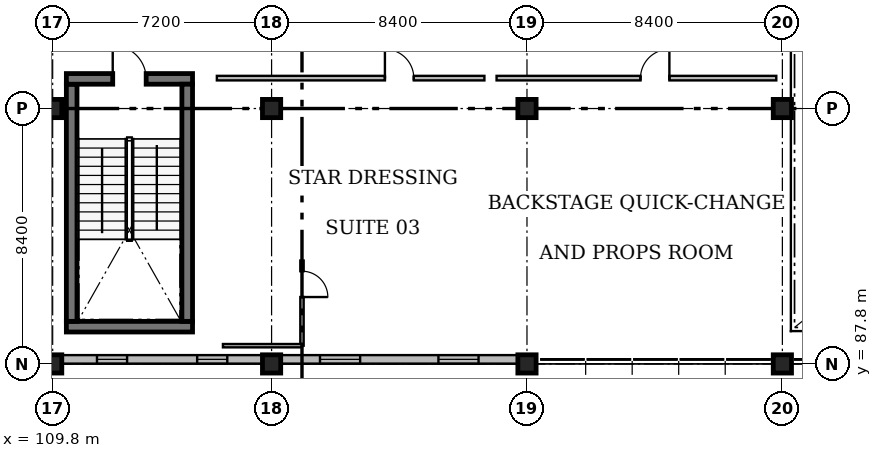
"""IFC4 building model, lengths in metres.
Left out: names, types, materials, properties, quantities, classifications, styles, units other than length and angle.
Written with IfcOpenShell. Run it as: python <this file> out.ifc"""

import sys

from ifc_helpers import new_model, si_unit, direction, frame, frame_2d, origin, origin_2d, place, context, subcontext, project, spatial, rectangle, extrude, element, fill, save


model = new_model("IFC4")
c1 = context("Model", 3, precision=1e-05, world=origin(), true_north=direction((0.0, 1.0)))
c2 = subcontext(c1, "Body", "Model", "MODEL_VIEW")
j1 = project(units=[si_unit("LENGTHUNIT", "METRE"), si_unit("PLANEANGLEUNIT", "RADIAN")], contexts=[c1])
p1 = place(None, origin())
s1 = spatial("IfcSite", under=j1, at=p1, CompositionType="ELEMENT")
p2 = place(p1, origin())
s2 = spatial("IfcBuilding", under=s1, at=p2, CompositionType="ELEMENT")
p3 = place(p2, frame((0.0, 0.0, 4.8)))
s3 = spatial("IfcBuildingStorey", under=s2, at=p3, CompositionType="ELEMENT", Elevation=4.8)
for number, where, z_axis, x_axis in (
    (1, (109.8, 87.8, 0.0), (0.0, 0.0, 1.0), (1.0, 0.0, 0.0)),
    (2, (109.8, 96.2, 0.0), (0.0, 0.0, 1.0), (1.0, 0.0, 0.0)),
    (3, (117.0, 87.8, 0.0), (0.0, 0.0, 1.0), (1.0, 0.0, 0.0)),
    (4, (117.0, 96.2, 0.0), (0.0, 0.0, 1.0), (1.0, 0.0, 0.0)),
    (5, (125.4, 87.8, 0.0), (0.0, 0.0, 1.0), (1.0, 0.0, 0.0)),
    (6, (125.4, 96.2, 0.0), (0.0, 0.0, 1.0), (1.0, 0.0, 0.0)),
    (7, (133.8, 87.8, 0.0), (0.0, 0.0, 1.0), (1.0, 0.0, 0.0)),
    (8, (133.8, 96.2, 0.0), (0.0, 0.0, 1.0), (1.0, 0.0, 0.0)),
):
    element("IfcColumn", number, at=place(p3, frame(where, z_axis=z_axis, x_axis=x_axis)), inside=s3, PredefinedType="COLUMN", context=c2, shape_type="SweptSolid", body=[
        extrude(rectangle(XDim=0.6, YDim=0.6, at=origin_2d()), origin(), (0.0, 0.0, 1.0), 4.2),
    ])
p4 = place(p3, frame((114.4, 89.025, 0.0), z_axis=(0.0, 0.0, 1.0), x_axis=(-1.0, 0.0, 0.0)))
e9 = element("IfcWall", 9, at=p4, inside=s3, PredefinedType="SOLIDWALL", context=c2, shape_type="SweptSolid", body=[
    extrude(rectangle(XDim=4.15, YDim=0.35, at=frame_2d((2.075, 0.0))), origin(), (0.0, 0.0, 1.0), 4.2),
])
p5 = place(p3, frame((110.425, 89.2, 0.0), z_axis=(0.0, 0.0, 1.0), x_axis=(0.0, 1.0, 0.0)))
e10 = element("IfcWall", 10, at=p5, inside=s3, PredefinedType="SOLIDWALL", context=c2, shape_type="SweptSolid", body=[
    extrude(rectangle(XDim=7.8, YDim=0.35, at=frame_2d((3.9, 0.0))), origin(), (0.0, 0.0, 1.0), 4.2),
])
p6 = place(p3, frame((110.25, 97.175, 0.0), z_axis=(0.0, 0.0, 1.0), x_axis=(1.0, 0.0, 0.0)))
e11 = element("IfcWall", 11, at=p6, inside=s3, PredefinedType="SOLIDWALL", context=c2, shape_type="SweptSolid", body=[
    extrude(rectangle(XDim=4.15, YDim=0.35, at=frame_2d((2.075, 0.0))), origin(), (0.0, 0.0, 1.0), 4.2),
])
p7 = place(p6, frame((1.525, 0.0, 0.0)))
e12 = element("IfcOpeningElement", 12, at=p7, cuts=e11, PredefinedType="OPENING", context=c2, shape_type="SweptSolid", body=[
    extrude(rectangle(XDim=1.1, YDim=2.15, at=frame_2d((0.55, 1.075))), frame((0.0, 0.195, 0.0), z_axis=(0.0, -1.0, 0.0), x_axis=(1.0, 0.0, 0.0)), (0.0, 0.0, 1.0), 0.39),
])
p8 = place(p3, frame((114.225, 97.0, 0.0), z_axis=(0.0, 0.0, 1.0), x_axis=(0.0, -1.0, 0.0)))
e13 = element("IfcWall", 13, at=p8, inside=s3, PredefinedType="SOLIDWALL", context=c2, shape_type="SweptSolid", body=[
    extrude(rectangle(XDim=7.8, YDim=0.35, at=frame_2d((3.9, 0.0))), origin(), (0.0, 0.0, 1.0), 4.2),
])
p9 = place(p3, frame((110.105, 87.95, 0.0), z_axis=(0.0, 0.0, 1.0), x_axis=(1.0, 0.0, 0.0)))
e14 = element("IfcWall", 14, at=p9, inside=s3, PredefinedType="SOLIDWALL", context=c2, shape_type="SweptSolid", body=[
    extrude(rectangle(XDim=6.59, YDim=0.28, at=frame_2d((3.295, 0.0))), origin(), (0.0, 0.0, 1.0), 3.273),
])
p10 = place(p9, frame((1.153, 0.0, 0.95)))
e15 = element("IfcOpeningElement", 15, at=p10, cuts=e14, PredefinedType="OPENING", context=c2, shape_type="SweptSolid", body=[
    extrude(rectangle(XDim=0.99, YDim=1.8, at=frame_2d((0.495, 0.9))), frame((0.0, 0.16, 0.0), z_axis=(0.0, -1.0, 0.0), x_axis=(1.0, 0.0, 0.0)), (0.0, 0.0, 1.0), 0.32),
])
p11 = place(p9, frame((4.448, 0.0, 0.95)))
e16 = element("IfcOpeningElement", 16, at=p11, cuts=e14, PredefinedType="OPENING", context=c2, shape_type="SweptSolid", body=[
    extrude(rectangle(XDim=0.99, YDim=1.8, at=frame_2d((0.495, 0.9))), frame((0.0, 0.16, 0.0), z_axis=(0.0, -1.0, 0.0), x_axis=(1.0, 0.0, 0.0)), (0.0, 0.0, 1.0), 0.32),
])
p12 = place(p3, frame((117.305, 87.95, 0.0), z_axis=(0.0, 0.0, 1.0), x_axis=(1.0, 0.0, 0.0)))
e17 = element("IfcWall", 17, at=p12, inside=s3, PredefinedType="SOLIDWALL", context=c2, shape_type="SweptSolid", body=[
    extrude(rectangle(XDim=7.79, YDim=0.28, at=frame_2d((3.895, 0.0))), origin(), (0.0, 0.0, 1.0), 3.273),
])
p13 = place(p12, frame((1.288, 0.0, 0.95)))
e18 = element("IfcOpeningElement", 18, at=p13, cuts=e17, PredefinedType="OPENING", context=c2, shape_type="SweptSolid", body=[
    extrude(rectangle(XDim=1.32, YDim=1.65, at=frame_2d((0.66, 0.825))), frame((0.0, 0.16, 0.0), z_axis=(0.0, -1.0, 0.0), x_axis=(1.0, 0.0, 0.0)), (0.0, 0.0, 1.0), 0.32),
])
p14 = place(p12, frame((5.183, 0.0, 0.95)))
e19 = element("IfcOpeningElement", 19, at=p14, cuts=e17, PredefinedType="OPENING", context=c2, shape_type="SweptSolid", body=[
    extrude(rectangle(XDim=1.32, YDim=1.65, at=frame_2d((0.66, 0.825))), frame((0.0, 0.16, 0.0), z_axis=(0.0, -1.0, 0.0), x_axis=(1.0, 0.0, 0.0)), (0.0, 0.0, 1.0), 0.32),
])
p15 = place(p3, frame((118.0, 91.2, 0.0), z_axis=(0.0, 0.0, 1.0), x_axis=(0.0, -1.0, 0.0)))
e20 = element("IfcWall", 20, at=p15, inside=s3, PredefinedType="PARTITIONING", context=c2, shape_type="SweptSolid", body=[
    extrude(rectangle(XDim=2.8, YDim=0.11, at=frame_2d((1.4, 0.0))), origin(), (0.0, 0.0, 1.0), 3.94),
])
p16 = place(p15, frame((0.35, 0.0, 0.0)))
e21 = element("IfcOpeningElement", 21, at=p16, cuts=e20, PredefinedType="OPENING", context=c2, shape_type="SweptSolid", body=[
    extrude(rectangle(XDim=0.85, YDim=2.1, at=frame_2d((0.425, 1.05))), frame((0.0, 0.075, 0.0), z_axis=(0.0, -1.0, 0.0), x_axis=(1.0, 0.0, 0.0)), (0.0, 0.0, 1.0), 0.15),
])
p17 = place(p3, frame((118.0, 88.4, 0.0), z_axis=(0.0, 0.0, 1.0), x_axis=(-1.0, 0.0, 0.0)))
e22 = element("IfcWall", 22, at=p17, inside=s3, PredefinedType="PARTITIONING", context=c2, shape_type="SweptSolid", body=[
    extrude(rectangle(XDim=2.6, YDim=0.11, at=frame_2d((1.3, 0.0))), origin(), (0.0, 0.0, 1.0), 3.94),
])
p18 = place(p3, frame((115.2, 97.2, 0.0), z_axis=(0.0, 0.0, 1.0), x_axis=(1.0, 0.0, 0.0)))
e23 = element("IfcWall", 23, at=p18, inside=s3, PredefinedType="PARTITIONING", context=c2, shape_type="SweptSolid", body=[
    extrude(rectangle(XDim=8.8, YDim=0.15, at=frame_2d((4.4, 0.0))), origin(), (0.0, 0.0, 1.0), 3.94),
])
p19 = place(p18, frame((5.528, 0.0, 0.0)))
e24 = element("IfcOpeningElement", 24, at=p19, cuts=e23, PredefinedType="OPENING", context=c2, shape_type="SweptSolid", body=[
    extrude(rectangle(XDim=0.95, YDim=2.2, at=frame_2d((0.475, 1.1))), frame((0.0, 0.095, 0.0), z_axis=(0.0, -1.0, 0.0), x_axis=(1.0, 0.0, 0.0)), (0.0, 0.0, 1.0), 0.19),
])
p20 = place(p3, frame((124.4, 97.2, 0.0), z_axis=(0.0, 0.0, 1.0), x_axis=(1.0, 0.0, 0.0)))
e25 = element("IfcWall", 25, at=p20, inside=s3, PredefinedType="PARTITIONING", context=c2, shape_type="SweptSolid", body=[
    extrude(rectangle(XDim=9.2, YDim=0.15, at=frame_2d((4.6, 0.0))), origin(), (0.0, 0.0, 1.0), 3.94),
])
p21 = place(p20, frame((4.734, 0.0, 0.0)))
e26 = element("IfcOpeningElement", 26, at=p21, cuts=e25, PredefinedType="OPENING", context=c2, shape_type="SweptSolid", body=[
    extrude(rectangle(XDim=0.95, YDim=2.2, at=frame_2d((0.475, 1.1))), frame((0.0, 0.095, 0.0), z_axis=(0.0, -1.0, 0.0), x_axis=(1.0, 0.0, 0.0)), (0.0, 0.0, 1.0), 0.19),
])
p22 = place(p7, origin())
e27 = element("IfcDoor", 27, at=p22, inside=s3, OperationType="SINGLE_SWING_LEFT", PredefinedType="DOOR", context=c2, shape_type="SweptSolid", body=[
    extrude(rectangle(XDim=1.1, YDim=2.15, at=frame_2d((0.55, 1.075))), frame((0.0, 0.025, 0.0), z_axis=(0.0, -1.0, 0.0), x_axis=(1.0, 0.0, 0.0)), (0.0, 0.0, 1.0), 0.05),
])
fill(e12, e27)
p23 = place(p10, origin())
e28 = element("IfcWindow", 28, at=p23, inside=s3, PartitioningType="SINGLE_PANEL", PredefinedType="WINDOW", context=c2, shape_type="SweptSolid", body=[
    extrude(rectangle(XDim=0.99, YDim=1.8, at=frame_2d((0.495, 0.9))), frame((0.0, 0.03, 0.0), z_axis=(0.0, -1.0, 0.0), x_axis=(1.0, 0.0, 0.0)), (0.0, 0.0, 1.0), 0.06),
])
fill(e15, e28)
p24 = place(p11, origin())
e29 = element("IfcWindow", 29, at=p24, inside=s3, PartitioningType="SINGLE_PANEL", PredefinedType="WINDOW", context=c2, shape_type="SweptSolid", body=[
    extrude(rectangle(XDim=0.99, YDim=1.8, at=frame_2d((0.495, 0.9))), frame((0.0, 0.03, 0.0), z_axis=(0.0, -1.0, 0.0), x_axis=(1.0, 0.0, 0.0)), (0.0, 0.0, 1.0), 0.06),
])
fill(e16, e29)
p25 = place(p13, origin())
e30 = element("IfcWindow", 30, at=p25, inside=s3, PartitioningType="SINGLE_PANEL", PredefinedType="WINDOW", context=c2, shape_type="SweptSolid", body=[
    extrude(rectangle(XDim=1.32, YDim=1.65, at=frame_2d((0.66, 0.825))), frame((0.0, 0.03, 0.0), z_axis=(0.0, -1.0, 0.0), x_axis=(1.0, 0.0, 0.0)), (0.0, 0.0, 1.0), 0.06),
])
fill(e18, e30)
p26 = place(p14, origin())
e31 = element("IfcWindow", 31, at=p26, inside=s3, PartitioningType="SINGLE_PANEL", PredefinedType="WINDOW", context=c2, shape_type="SweptSolid", body=[
    extrude(rectangle(XDim=1.32, YDim=1.65, at=frame_2d((0.66, 0.825))), frame((0.0, 0.03, 0.0), z_axis=(0.0, -1.0, 0.0), x_axis=(1.0, 0.0, 0.0)), (0.0, 0.0, 1.0), 0.06),
])
fill(e19, e31)
p27 = place(p16, origin())
e32 = element("IfcDoor", 32, at=p27, inside=s3, OperationType="SINGLE_SWING_RIGHT", PredefinedType="DOOR", context=c2, shape_type="SweptSolid", body=[
    extrude(rectangle(XDim=0.85, YDim=2.1, at=frame_2d((0.425, 1.05))), frame((0.0, 0.025, 0.0), z_axis=(0.0, -1.0, 0.0), x_axis=(1.0, 0.0, 0.0)), (0.0, 0.0, 1.0), 0.05),
])
fill(e21, e32)
p28 = place(p19, origin())
e33 = element("IfcDoor", 33, at=p28, inside=s3, OperationType="SINGLE_SWING_LEFT", PredefinedType="DOOR", context=c2, shape_type="SweptSolid", body=[
    extrude(rectangle(XDim=0.95, YDim=2.2, at=frame_2d((0.475, 1.1))), frame((0.0, 0.025, 0.0), z_axis=(0.0, -1.0, 0.0), x_axis=(1.0, 0.0, 0.0)), (0.0, 0.0, 1.0), 0.05),
])
fill(e24, e33)
p29 = place(p21, origin())
e34 = element("IfcDoor", 34, at=p29, inside=s3, OperationType="SINGLE_SWING_RIGHT", PredefinedType="DOOR", context=c2, shape_type="SweptSolid", body=[
    extrude(rectangle(XDim=0.95, YDim=2.2, at=frame_2d((0.475, 1.1))), frame((0.0, 0.025, 0.0), z_axis=(0.0, -1.0, 0.0), x_axis=(1.0, 0.0, 0.0)), (0.0, 0.0, 1.0), 0.05),
])
fill(e26, e34)
save(model, sys.argv[1])
